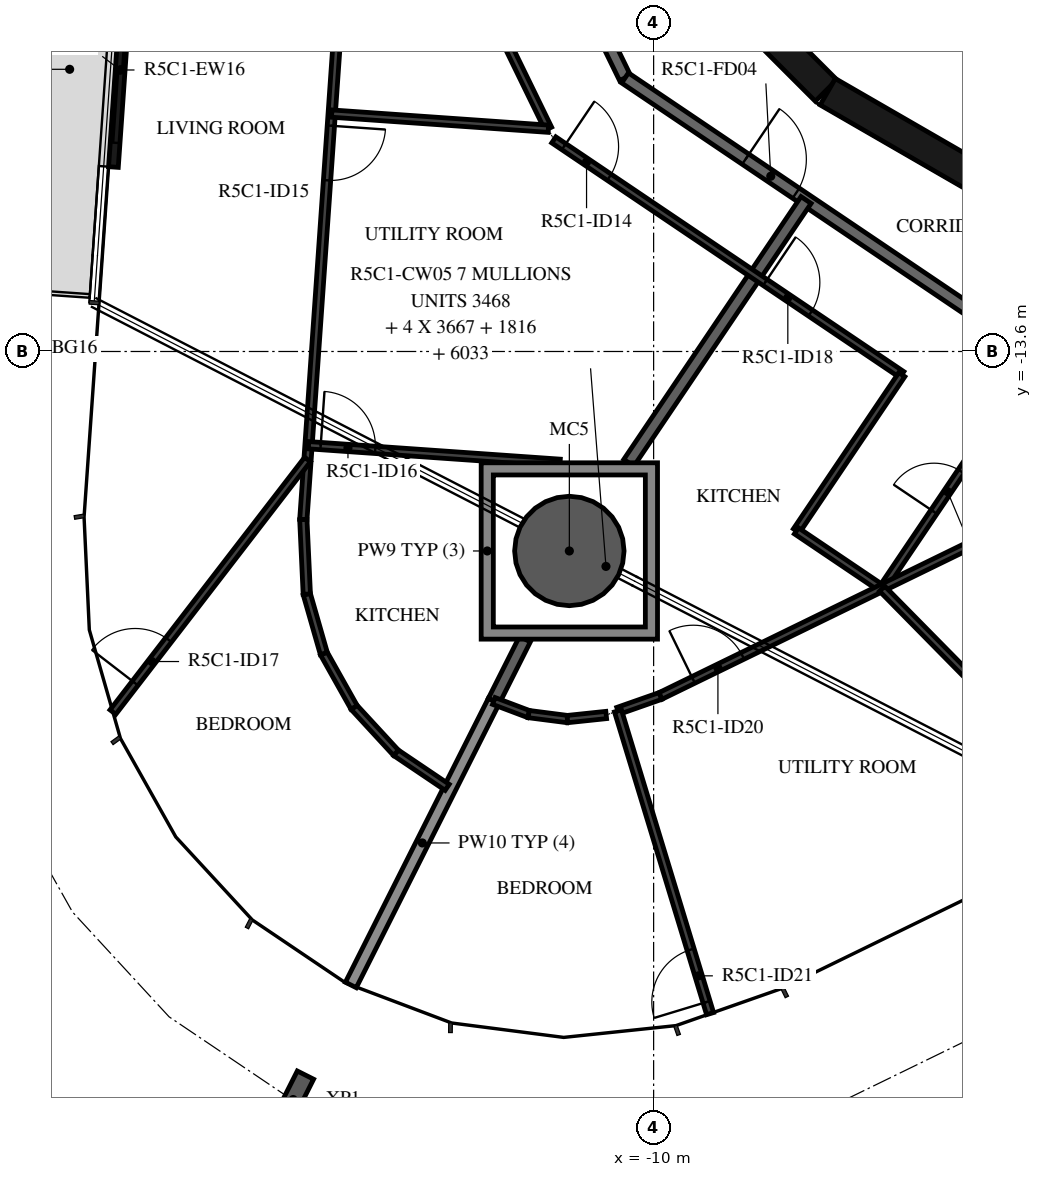
"""IFC4 building model, lengths in metres.
Left out: names, types, materials, properties, quantities, classifications, styles, units other than length and angle.
Written with IfcOpenShell. Run it as: python <this file> out.ifc"""

import sys

from ifc_helpers import new_model, si_unit, direction, frame, frame_2d, origin, origin_2d, place, context, subcontext, project, spatial, polyline, rectangle, hollow_circle, i_section, outline, extrude, element, fill, save


model = new_model("IFC4")
c1 = context("Model", 3, precision=1e-05, world=origin(), true_north=direction((0.0, 1.0)))
c2 = subcontext(c1, "Body", "Model", "MODEL_VIEW")
j1 = project(units=[si_unit("LENGTHUNIT", "METRE"), si_unit("PLANEANGLEUNIT", "RADIAN")], contexts=[c1])
p1 = place(None, origin())
s1 = spatial("IfcSite", under=j1, at=p1, CompositionType="ELEMENT")
p2 = place(p1, origin())
s2 = spatial("IfcBuilding", under=s1, at=p2, CompositionType="ELEMENT")
p3 = place(p2, frame((0.0, 0.0, 212.9)))
s3 = spatial("IfcBuildingStorey", under=s2, at=p3, CompositionType="ELEMENT", Elevation=212.9)
p4 = place(p3, frame((-11.386, -16.881, -0.38), z_axis=(0.0, 0.0, 1.0), x_axis=(1.0, 0.0, 0.0)))
e1 = element("IfcColumn", 1, at=p4, inside=s3, PredefinedType="COLUMN", context=c2, shape_type="SweptSolid", body=[
    extrude(hollow_circle(Radius=0.9, WallThickness=0.04, at=origin_2d()), origin(), (0.0, 0.0, 1.0), 3.5),
])
p5 = place(p3, frame((-15.928, -25.902, -0.38), z_axis=(0.0, 0.0, 1.0), x_axis=(-0.893169071277, 0.449721035881, 0.0)))
e2 = element("IfcColumn", 2, at=p5, inside=s3, PredefinedType="COLUMN", context=c2, shape_type="SweptSolid", body=[
    extrude(i_section(OverallWidth=0.3, OverallDepth=0.9, WebThickness=0.019, FlangeThickness=0.035, FilletRadius=0.03, at=origin_2d()), origin(), (0.0, 0.0, 1.0), 3.5),
])
p6 = place(p3, frame((-18.661, -7.375, 0.0), z_axis=(0.0, 0.0, 1.0), x_axis=(-0.069734222855, -0.997565605944, 0.0)))
e3 = element("IfcWall", 3, at=p6, inside=s3, PredefinedType="STANDARD", context=c2, shape_type="SweptSolid", body=[
    extrude(rectangle(XDim=3.2, YDim=0.16, at=frame_2d((1.6, 0.0))), origin(), (0.0, 0.0, 1.0), 3.12),
])
p7 = place(p6, frame((0.4, 0.0, 0.0)))
e4 = element("IfcOpeningElement", 4, at=p7, cuts=e3, PredefinedType="OPENING", context=c2, shape_type="SweptSolid", body=[
    extrude(rectangle(XDim=2.4, YDim=2.4, at=frame_2d((1.2, 1.2))), frame((0.0, 0.09, 0.0), z_axis=(0.0, -1.0, 0.0), x_axis=(1.0, 0.0, 0.0)), (0.0, 0.0, 1.0), 0.18),
])
p8 = place(p3, frame((-9.308, -7.164, 0.0), z_axis=(0.0, 0.0, 1.0), x_axis=(0.707106781187, -0.707106781187, 0.0)))
e5 = element("IfcWall", 5, at=p8, inside=s3, PredefinedType="SHEAR", context=c2, shape_type="SweptSolid", body=[
    extrude(rectangle(XDim=3.032, YDim=0.5, at=frame_2d((1.516, 0.0))), origin(), (0.0, 0.0, 1.0), 3.12),
])
p9 = place(p3, frame((-7.137, -9.329, 0.0), z_axis=(0.0, 0.0, 1.0), x_axis=(0.865975092491, -0.500087131594, 0.0)))
e6 = element("IfcWall", 6, at=p9, inside=s3, PredefinedType="SHEAR", context=c2, shape_type="SweptSolid", body=[
    extrude(rectangle(XDim=3.033, YDim=0.5, at=frame_2d((1.516, 0.0))), origin(), (0.0, 0.0, 1.0), 3.12),
])
p10 = place(p3, frame((-11.633, -6.716, 0.0), z_axis=(0.0, 0.0, 1.0), x_axis=(0.438322116278, -0.898817958422, 0.0)))
e7 = element("IfcWall", 7, at=p10, inside=s3, PredefinedType="STANDARD", context=c2, shape_type="SweptSolid", body=[
    extrude(rectangle(XDim=2.654, YDim=0.2, at=frame_2d((1.327, 0.0))), origin(), (0.0, 0.0, 1.0), 3.12),
])
p11 = place(p3, frame((-10.47, -9.101, 0.0), z_axis=(0.0, 0.0, 1.0), x_axis=(0.829035841718, -0.559195469534, 0.0)))
e8 = element("IfcWall", 8, at=p11, inside=s3, PredefinedType="STANDARD", context=c2, shape_type="SweptSolid", body=[
    extrude(rectangle(XDim=7.181, YDim=0.2, at=frame_2d((3.591, 0.0))), origin(), (0.0, 0.0, 1.0), 3.12),
])
p12 = place(p11, frame((2.39, 0.0, 0.0)))
e9 = element("IfcOpeningElement", 9, at=p12, cuts=e8, PredefinedType="OPENING", context=c2, shape_type="SweptSolid", body=[
    extrude(rectangle(XDim=1.0, YDim=2.1, at=frame_2d((0.5, 1.05))), frame((0.0, 0.11, 0.0), z_axis=(0.0, -1.0, 0.0), x_axis=(1.0, 0.0, 0.0)), (0.0, 0.0, 1.0), 0.22),
])
p13 = place(p3, frame((-10.408, -15.43, 0.0), z_axis=(0.0, 0.0, 1.0), x_axis=(0.559199317758, 0.829033246027, 0.0)))
e10 = element("IfcWall", 10, at=p13, inside=s3, PredefinedType="STANDARD", context=c2, shape_type="SweptSolid", body=[
    extrude(rectangle(XDim=5.212, YDim=0.2, at=frame_2d((2.606, 0.0))), origin(), (0.0, 0.0, 1.0), 3.12),
])
p14 = place(p3, frame((-14.979, -24.017, 0.0), z_axis=(0.0, 0.0, 1.0), x_axis=(0.449732900329, 0.89316309729, 0.0)))
e11 = element("IfcWall", 11, at=p14, inside=s3, PredefinedType="STANDARD", context=c2, shape_type="SweptSolid", body=[
    extrude(rectangle(XDim=5.229, YDim=0.2, at=frame_2d((2.615, 0.0))), origin(), (0.0, 0.0, 1.0), 2.73),
])
p15 = place(p3, frame((-12.628, -19.347, 0.0), z_axis=(0.0, 0.0, 1.0), x_axis=(0.449615653781, 0.8932221246, 0.0)))
e12 = element("IfcWall", 12, at=p15, inside=s3, PredefinedType="STANDARD", context=c2, shape_type="SweptSolid", body=[
    extrude(rectangle(XDim=1.138, YDim=0.2, at=frame_2d((0.569, 0.0))), origin(), (0.0, 0.0, 1.0), 3.12),
])
p16 = place(p3, frame((-14.383, -4.5, 0.0), z_axis=(0.0, 0.0, 1.0), x_axis=(0.438393414895, -0.898783185077, 0.0)))
e13 = element("IfcWall", 13, at=p16, inside=s3, PredefinedType="PARTITIONING", context=c2, shape_type="SweptSolid", body=[
    extrude(rectangle(XDim=6.049, YDim=0.12, at=frame_2d((3.024, 0.0))), origin(), (0.0, 0.0, 1.0), 3.12),
])
p17 = place(p16, frame((0.4, 0.0, 0.0)))
e14 = element("IfcOpeningElement", 14, at=p17, cuts=e13, PredefinedType="OPENING", context=c2, shape_type="SweptSolid", body=[
    extrude(rectangle(XDim=0.8, YDim=2.1, at=frame_2d((0.4, 1.05))), frame((0.0, 0.07, 0.0), z_axis=(0.0, -1.0, 0.0), x_axis=(1.0, 0.0, 0.0)), (0.0, 0.0, 1.0), 0.14),
])
p18 = place(p3, frame((-11.642, -10.12, 0.0), z_axis=(0.0, 0.0, 1.0), x_axis=(0.829029427133, -0.559204979365, 0.0)))
e15 = element("IfcWall", 15, at=p18, inside=s3, PredefinedType="PARTITIONING", context=c2, shape_type="SweptSolid", body=[
    extrude(rectangle(XDim=6.904, YDim=0.12, at=frame_2d((3.452, 0.0))), origin(), (0.0, 0.0, 1.0), 3.12),
])
p19 = place(p18, frame((0.2, 0.0, 0.0)))
e16 = element("IfcOpeningElement", 16, at=p19, cuts=e15, PredefinedType="OPENING", context=c2, shape_type="SweptSolid", body=[
    extrude(rectangle(XDim=0.9, YDim=2.1, at=frame_2d((0.45, 1.05))), frame((0.0, 0.07, 0.0), z_axis=(0.0, -1.0, 0.0), x_axis=(1.0, 0.0, 0.0)), (0.0, 0.0, 1.0), 0.14),
])
p20 = place(p18, frame((4.192, 0.0, 0.0)))
e17 = element("IfcOpeningElement", 17, at=p20, cuts=e15, PredefinedType="OPENING", context=c2, shape_type="SweptSolid", body=[
    extrude(rectangle(XDim=0.9, YDim=2.1, at=frame_2d((0.45, 1.05))), frame((0.0, 0.07, 0.0), z_axis=(0.0, -1.0, 0.0), x_axis=(1.0, 0.0, 0.0)), (0.0, 0.0, 1.0), 0.14),
])
p21 = place(p3, frame((-14.931, -4.5, 0.0), z_axis=(0.0, 0.0, 1.0), x_axis=(-0.069751708439, -0.997564383471, 0.0)))
e18 = element("IfcWall", 18, at=p21, inside=s3, PredefinedType="PARTITIONING", context=c2, shape_type="SweptSolid", body=[
    extrude(rectangle(XDim=11.894, YDim=0.12, at=frame_2d((5.947, 0.0))), origin(), (0.0, 0.0, 1.0), 3.12),
])
p22 = place(p21, frame((5.4, 0.0, 0.0)))
e19 = element("IfcOpeningElement", 19, at=p22, cuts=e18, PredefinedType="OPENING", context=c2, shape_type="SweptSolid", body=[
    extrude(rectangle(XDim=0.9, YDim=2.1, at=frame_2d((0.45, 1.05))), frame((0.0, 0.07, 0.0), z_axis=(0.0, -1.0, 0.0), x_axis=(1.0, 0.0, 0.0)), (0.0, 0.0, 1.0), 0.14),
])
p23 = place(p3, frame((-15.294, -9.688, 0.0), z_axis=(0.0, 0.0, 1.0), x_axis=(0.997565819809, -0.069731163391, 0.0)))
e20 = element("IfcWall", 20, at=p23, inside=s3, PredefinedType="PARTITIONING", context=c2, shape_type="SweptSolid", body=[
    extrude(rectangle(XDim=3.571, YDim=0.12, at=frame_2d((1.786, 0.0))), origin(), (0.0, 0.0, 1.0), 3.12),
])
p24 = place(p3, frame((-18.892, -19.531, 0.0), z_axis=(0.0, 0.0, 1.0), x_axis=(0.610347240441, 0.792133982408, 0.0)))
e21 = element("IfcWall", 21, at=p24, inside=s3, PredefinedType="PARTITIONING", context=c2, shape_type="SweptSolid", body=[
    extrude(rectangle(XDim=5.244, YDim=0.12, at=frame_2d((2.622, 0.0))), origin(), (0.0, 0.0, 1.0), 3.12),
])
p25 = place(p24, frame((0.6, 0.0, 0.0)))
e22 = element("IfcOpeningElement", 22, at=p25, cuts=e21, PredefinedType="OPENING", context=c2, shape_type="SweptSolid", body=[
    extrude(rectangle(XDim=0.9, YDim=2.1, at=frame_2d((0.45, 1.05))), frame((0.0, 0.07, 0.0), z_axis=(0.0, -1.0, 0.0), x_axis=(1.0, 0.0, 0.0)), (0.0, 0.0, 1.0), 0.14),
])
p26 = place(p3, frame((-15.675, -15.141, 0.0), z_axis=(0.0, 0.0, 1.0), x_axis=(0.997563107735, -0.06976995117, 0.0)))
e23 = element("IfcWall", 23, at=p26, inside=s3, PredefinedType="PARTITIONING", context=c2, shape_type="SweptSolid", body=[
    extrude(rectangle(XDim=4.146, YDim=0.12, at=frame_2d((2.073, 0.0))), origin(), (0.0, 0.0, 1.0), 3.12),
])
p27 = place(p26, frame((0.2, 0.0, 0.0)))
e24 = element("IfcOpeningElement", 24, at=p27, cuts=e23, PredefinedType="OPENING", context=c2, shape_type="SweptSolid", body=[
    extrude(rectangle(XDim=0.9, YDim=2.1, at=frame_2d((0.45, 1.05))), frame((0.0, 0.07, 0.0), z_axis=(0.0, -1.0, 0.0), x_axis=(1.0, 0.0, 0.0)), (0.0, 0.0, 1.0), 0.14),
])
for number, where, z_axis, x_axis in (
    (25, (-13.395, -20.767, 0.0), (0.0, 0.0, 1.0), (-0.829, 0.559, 0.0)),
    (26, (-14.237, -20.199, 0.0), (0.0, 0.0, 1.0), (-0.678, 0.735, 0.0)),
):
    element("IfcWall", number, at=place(p3, frame(where, z_axis=z_axis, x_axis=x_axis)), inside=s3, PredefinedType="PARTITIONING", context=c2, shape_type="SweptSolid", body=[
        extrude(rectangle(XDim=1.016, YDim=0.12, at=frame_2d((0.508, 0.0))), origin(), (0.0, 0.0, 1.0), 3.12),
    ])
p28 = place(p3, frame((-14.926, -19.452, 0.0), z_axis=(0.0, 0.0, 1.0), x_axis=(-0.489941776958, 0.871755157823, 0.0)))
e27 = element("IfcWall", 27, at=p28, inside=s3, PredefinedType="PARTITIONING", context=c2, shape_type="SweptSolid", body=[
    extrude(rectangle(XDim=1.016, YDim=0.12, at=frame_2d((0.508, 0.0))), origin(), (0.0, 0.0, 1.0), 3.12),
])
p29 = place(p3, frame((-15.424, -18.567, 0.0), z_axis=(0.0, 0.0, 1.0), x_axis=(-0.275641454312, 0.961260520704, 0.0)))
e28 = element("IfcWall", 28, at=p29, inside=s3, PredefinedType="PARTITIONING", context=c2, shape_type="SweptSolid", body=[
    extrude(rectangle(XDim=1.016, YDim=0.12, at=frame_2d((0.508, 0.0))), origin(), (0.0, 0.0, 1.0), 3.12),
])
p30 = place(p3, frame((-15.704, -17.59, 0.0), z_axis=(0.0, 0.0, 1.0), x_axis=(-0.046364428258, 0.998924591645, 0.0)))
e29 = element("IfcWall", 29, at=p30, inside=s3, PredefinedType="PARTITIONING", context=c2, shape_type="SweptSolid", body=[
    extrude(rectangle(XDim=1.227, YDim=0.12, at=frame_2d((0.613, 0.0))), origin(), (0.0, 0.0, 1.0), 3.12),
])
p31 = place(p3, frame((-5.918, -13.981, 0.0), z_axis=(0.0, 0.0, 1.0), x_axis=(-0.559254999968, -0.828995684555, 0.0)))
e30 = element("IfcWall", 30, at=p31, inside=s3, PredefinedType="PARTITIONING", context=c2, shape_type="SweptSolid", body=[
    extrude(rectangle(XDim=3.099, YDim=0.12, at=frame_2d((1.55, 0.0))), origin(), (0.0, 0.0, 1.0), 3.12),
])
p32 = place(p3, frame((-7.652, -16.55, 0.0), z_axis=(0.0, 0.0, 1.0), x_axis=(0.829053397483, -0.559169441334, 0.0)))
e31 = element("IfcWall", 31, at=p32, inside=s3, PredefinedType="PARTITIONING", context=c2, shape_type="SweptSolid", body=[
    extrude(rectangle(XDim=1.686, YDim=0.12, at=frame_2d((0.843, 0.0))), origin(), (0.0, 0.0, 1.0), 3.12),
])
p33 = place(p3, frame((-6.229, -17.48, 0.0), z_axis=(0.0, 0.0, 1.0), x_axis=(0.559206483048, 0.829028412853, 0.0)))
e32 = element("IfcWall", 32, at=p33, inside=s3, PredefinedType="PARTITIONING", context=c2, shape_type="SweptSolid", body=[
    extrude(rectangle(XDim=3.432, YDim=0.12, at=frame_2d((1.716, 0.0))), origin(), (0.0, 0.0, 1.0), 3.12),
])
p34 = place(p33, frame((1.5, 0.0, 0.0)))
e33 = element("IfcOpeningElement", 33, at=p34, cuts=e32, PredefinedType="OPENING", context=c2, shape_type="SweptSolid", body=[
    extrude(rectangle(XDim=0.8, YDim=2.1, at=frame_2d((0.4, 1.05))), frame((0.0, 0.07, 0.0), z_axis=(0.0, -1.0, 0.0), x_axis=(1.0, 0.0, 0.0)), (0.0, 0.0, 1.0), 0.14),
])
p35 = place(p3, frame((-12.628, -19.347, 0.0), z_axis=(0.0, 0.0, 1.0), x_axis=(0.935507243946, -0.353307509862, 0.0)))
e34 = element("IfcWall", 34, at=p35, inside=s3, PredefinedType="PARTITIONING", context=c2, shape_type="SweptSolid", body=[
    extrude(rectangle(XDim=0.612, YDim=0.12, at=frame_2d((0.306, 0.0))), origin(), (0.0, 0.0, 1.0), 3.12),
])
p36 = place(p3, frame((-12.055, -19.563, 0.0), z_axis=(0.0, 0.0, 1.0), x_axis=(0.991802759529, -0.127778269633, 0.0)))
e35 = element("IfcWall", 35, at=p36, inside=s3, PredefinedType="PARTITIONING", context=c2, shape_type="SweptSolid", body=[
    extrude(rectangle(XDim=0.642, YDim=0.12, at=frame_2d((0.321, 0.0))), origin(), (0.0, 0.0, 1.0), 3.12),
])
p37 = place(p3, frame((-11.418, -19.645, 0.0), z_axis=(0.0, 0.0, 1.0), x_axis=(0.994515867502, 0.104585798686, 0.0)))
e36 = element("IfcWall", 36, at=p37, inside=s3, PredefinedType="PARTITIONING", context=c2, shape_type="SweptSolid", body=[
    extrude(rectangle(XDim=0.642, YDim=0.12, at=frame_2d((0.321, 0.0))), origin(), (0.0, 0.0, 1.0), 3.12),
])
p38 = place(p3, frame((-10.586, -19.51, 0.0), z_axis=(0.0, 0.0, 1.0), x_axis=(0.943560277016, 0.3312008509, 0.0)))
e37 = element("IfcWall", 37, at=p38, inside=s3, PredefinedType="PARTITIONING", context=c2, shape_type="SweptSolid", body=[
    extrude(rectangle(XDim=0.741, YDim=0.12, at=frame_2d((0.371, 0.0))), origin(), (0.0, 0.0, 1.0), 3.12),
])
p39 = place(p3, frame((-9.886, -19.264, 0.0), z_axis=(0.0, 0.0, 1.0), x_axis=(0.898796326112, 0.43836647245, 0.0)))
e38 = element("IfcWall", 38, at=p39, inside=s3, PredefinedType="PARTITIONING", context=c2, shape_type="SweptSolid", body=[
    extrude(rectangle(XDim=10.014, YDim=0.12, at=frame_2d((5.007, 0.0))), origin(), (0.0, 0.0, 1.0), 3.12),
])
p40 = place(p39, frame((0.6, 0.0, 0.0)))
e39 = element("IfcOpeningElement", 39, at=p40, cuts=e38, PredefinedType="OPENING", context=c2, shape_type="SweptSolid", body=[
    extrude(rectangle(XDim=0.9, YDim=2.1, at=frame_2d((0.45, 1.05))), frame((0.0, 0.07, 0.0), z_axis=(0.0, -1.0, 0.0), x_axis=(1.0, 0.0, 0.0)), (0.0, 0.0, 1.0), 0.14),
])
p41 = place(p3, frame((-9.072, -24.489, 0.0), z_axis=(0.0, 0.0, 1.0), x_axis=(-0.291025348593, 0.956715342449, 0.0)))
e40 = element("IfcWall", 40, at=p41, inside=s3, PredefinedType="PARTITIONING", context=c2, shape_type="SweptSolid", body=[
    extrude(rectangle(XDim=5.205, YDim=0.12, at=frame_2d((2.602, 0.0))), origin(), (0.0, 0.0, 1.0), 3.12),
])
p42 = place(p41, frame((0.2, 0.0, 0.0)))
e41 = element("IfcOpeningElement", 41, at=p42, cuts=e40, PredefinedType="OPENING", context=c2, shape_type="SweptSolid", body=[
    extrude(rectangle(XDim=0.9, YDim=2.1, at=frame_2d((0.45, 1.05))), frame((0.0, 0.07, 0.0), z_axis=(0.0, -1.0, 0.0), x_axis=(1.0, 0.0, 0.0)), (0.0, 0.0, 1.0), 0.14),
])
p43 = place(p3, frame((-2.403, -21.4, 0.0), z_axis=(0.0, 0.0, 1.0), x_axis=(-0.70162063199, 0.712550692067, 0.0)))
e42 = element("IfcWall", 42, at=p43, inside=s3, PredefinedType="PARTITIONING", context=c2, shape_type="SweptSolid", body=[
    extrude(rectangle(XDim=5.472, YDim=0.12, at=frame_2d((2.736, 0.0))), origin(), (0.0, 0.0, 1.0), 3.12),
])
p44 = place(p3, origin())
e43 = element("IfcWall", 43, at=p44, inside=s3, PredefinedType="STANDARD", context=c2, shape_type="SweptSolid", body=[
    extrude(outline(polyline([(-9.936, -15.43), (-9.936, -18.331), (-12.836, -18.331), (-12.836, -15.43), (-9.936, -15.43)]), holes=[polyline([(-12.636, -18.131), (-10.136, -18.131), (-10.136, -15.631), (-12.636, -15.631), (-12.636, -18.131)])]), origin(), (0.0, 0.0, 1.0), 3.12),
])
p45 = place(p7, origin())
e44 = element("IfcDoor", 44, at=p45, inside=s3, OperationType="DOUBLE_DOOR_SLIDING", PredefinedType="DOOR", context=c2, shape_type="SweptSolid", body=[
    extrude(rectangle(XDim=2.4, YDim=2.4, at=frame_2d((1.2, 1.2))), frame((0.0, 0.025, 0.0), z_axis=(0.0, -1.0, 0.0), x_axis=(1.0, 0.0, 0.0)), (0.0, 0.0, 1.0), 0.05),
])
fill(e4, e44)
p46 = place(p12, origin())
e45 = element("IfcDoor", 45, at=p46, inside=s3, OperationType="SINGLE_SWING_RIGHT", PredefinedType="DOOR", context=c2, shape_type="SweptSolid", body=[
    extrude(rectangle(XDim=1.0, YDim=2.1, at=frame_2d((0.5, 1.05))), frame((0.0, 0.025, 0.0), z_axis=(0.0, -1.0, 0.0), x_axis=(1.0, 0.0, 0.0)), (0.0, 0.0, 1.0), 0.05),
])
fill(e9, e45)
p47 = place(p19, origin())
e46 = element("IfcDoor", 46, at=p47, inside=s3, OperationType="SINGLE_SWING_RIGHT", PredefinedType="DOOR", context=c2, shape_type="SweptSolid", body=[
    extrude(rectangle(XDim=0.9, YDim=2.1, at=frame_2d((0.45, 1.05))), frame((0.0, 0.025, 0.0), z_axis=(0.0, -1.0, 0.0), x_axis=(1.0, 0.0, 0.0)), (0.0, 0.0, 1.0), 0.05),
])
fill(e16, e46)
p48 = place(p22, origin())
e47 = element("IfcDoor", 47, at=p48, inside=s3, OperationType="SINGLE_SWING_RIGHT", PredefinedType="DOOR", context=c2, shape_type="SweptSolid", body=[
    extrude(rectangle(XDim=0.9, YDim=2.1, at=frame_2d((0.45, 1.05))), frame((0.0, 0.025, 0.0), z_axis=(0.0, -1.0, 0.0), x_axis=(1.0, 0.0, 0.0)), (0.0, 0.0, 1.0), 0.05),
])
fill(e19, e47)
p49 = place(p27, origin())
e48 = element("IfcDoor", 48, at=p49, inside=s3, OperationType="SINGLE_SWING_RIGHT", PredefinedType="DOOR", context=c2, shape_type="SweptSolid", body=[
    extrude(rectangle(XDim=0.9, YDim=2.1, at=frame_2d((0.45, 1.05))), frame((0.0, 0.025, 0.0), z_axis=(0.0, -1.0, 0.0), x_axis=(1.0, 0.0, 0.0)), (0.0, 0.0, 1.0), 0.05),
])
fill(e24, e48)
p50 = place(p25, origin())
e49 = element("IfcDoor", 49, at=p50, inside=s3, OperationType="SINGLE_SWING_RIGHT", PredefinedType="DOOR", context=c2, shape_type="SweptSolid", body=[
    extrude(rectangle(XDim=0.9, YDim=2.1, at=frame_2d((0.45, 1.05))), frame((0.0, 0.025, 0.0), z_axis=(0.0, -1.0, 0.0), x_axis=(1.0, 0.0, 0.0)), (0.0, 0.0, 1.0), 0.05),
])
fill(e22, e49)
p51 = place(p20, origin())
e50 = element("IfcDoor", 50, at=p51, inside=s3, OperationType="SINGLE_SWING_LEFT", PredefinedType="DOOR", context=c2, shape_type="SweptSolid", body=[
    extrude(rectangle(XDim=0.9, YDim=2.1, at=frame_2d((0.45, 1.05))), frame((0.0, 0.025, 0.0), z_axis=(0.0, -1.0, 0.0), x_axis=(1.0, 0.0, 0.0)), (0.0, 0.0, 1.0), 0.05),
])
fill(e17, e50)
p52 = place(p34, origin())
e51 = element("IfcDoor", 51, at=p52, inside=s3, OperationType="SINGLE_SWING_LEFT", PredefinedType="DOOR", context=c2, shape_type="SweptSolid", body=[
    extrude(rectangle(XDim=0.8, YDim=2.1, at=frame_2d((0.4, 1.05))), frame((0.0, 0.025, 0.0), z_axis=(0.0, -1.0, 0.0), x_axis=(1.0, 0.0, 0.0)), (0.0, 0.0, 1.0), 0.05),
])
fill(e33, e51)
p53 = place(p40, origin())
e52 = element("IfcDoor", 52, at=p53, inside=s3, OperationType="SINGLE_SWING_LEFT", PredefinedType="DOOR", context=c2, shape_type="SweptSolid", body=[
    extrude(rectangle(XDim=0.9, YDim=2.1, at=frame_2d((0.45, 1.05))), frame((0.0, 0.025, 0.0), z_axis=(0.0, -1.0, 0.0), x_axis=(1.0, 0.0, 0.0)), (0.0, 0.0, 1.0), 0.05),
])
fill(e39, e52)
p54 = place(p42, origin())
e53 = element("IfcDoor", 53, at=p54, inside=s3, OperationType="SINGLE_SWING_LEFT", PredefinedType="DOOR", context=c2, shape_type="SweptSolid", body=[
    extrude(rectangle(XDim=0.9, YDim=2.1, at=frame_2d((0.45, 1.05))), frame((0.0, 0.025, 0.0), z_axis=(0.0, -1.0, 0.0), x_axis=(1.0, 0.0, 0.0)), (0.0, 0.0, 1.0), 0.05),
])
fill(e41, e53)
save(model, sys.argv[1])
